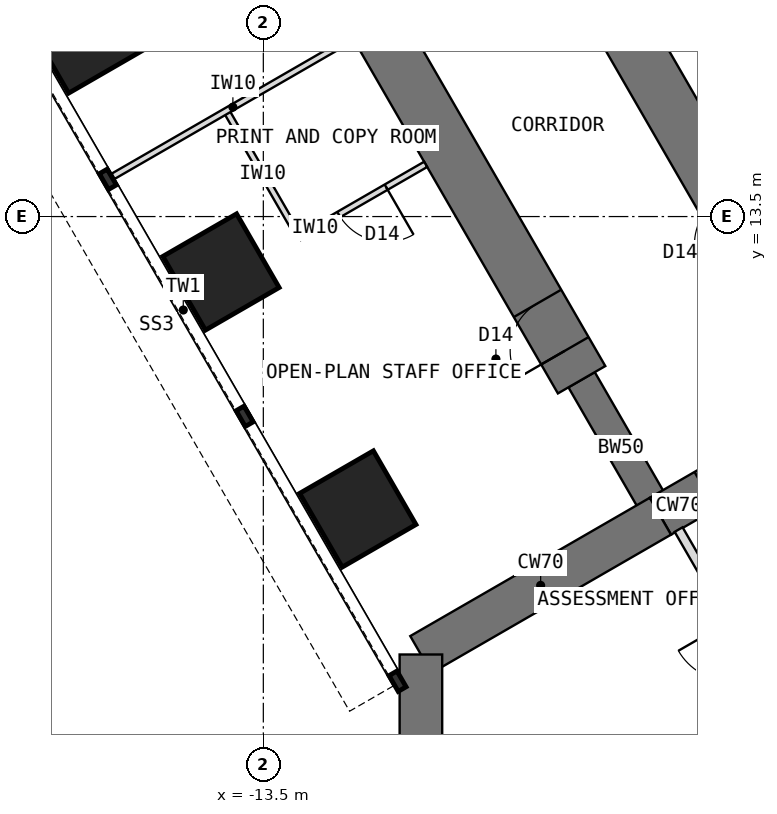
"""IFC4 building model, lengths in metres.
Left out: names, types, materials, properties, quantities, classifications, styles, units other than length and angle.
Written with IfcOpenShell. Run it as: python <this file> out.ifc"""

import sys

from ifc_helpers import new_model, si_unit, direction, frame, frame_2d, origin, origin_2d, place, context, subcontext, project, spatial, rectangle, extrude, element, fill, save


model = new_model("IFC4")
c1 = context("Model", 3, precision=1e-05, world=origin(), true_north=direction((0.0, 1.0)))
c2 = subcontext(c1, "Body", "Model", "MODEL_VIEW")
j1 = project(units=[si_unit("LENGTHUNIT", "METRE"), si_unit("PLANEANGLEUNIT", "RADIAN")], contexts=[c1])
p1 = place(None, origin())
s1 = spatial("IfcSite", under=j1, at=p1, CompositionType="ELEMENT")
p2 = place(p1, origin())
s2 = spatial("IfcBuilding", under=s1, at=p2, CompositionType="ELEMENT")
p3 = place(p2, frame((0.0, 0.0, 72.5)))
s3 = spatial("IfcBuildingStorey", under=s2, at=p3, CompositionType="ELEMENT", Elevation=72.5)
p4 = place(p3, frame((-3.939, 10.322, 0.0), z_axis=(0.0, 0.0, 1.0), x_axis=(-0.866019471182, -0.500010275428, 0.0)))
e1 = element("IfcWall", 1, at=p4, inside=s3, PredefinedType="SHEAR", context=c2, shape_type="SweptSolid", body=[
    extrude(rectangle(XDim=3.5, YDim=0.7, at=frame_2d((1.75, 0.0))), origin(), (0.0, 0.0, 1.0), 4.0),
])
p5 = place(p4, frame((0.85, 0.0, 0.0)))
e2 = element("IfcOpeningElement", 2, at=p5, cuts=e1, PredefinedType="OPENING", context=c2, shape_type="SweptSolid", body=[
    extrude(rectangle(XDim=1.8, YDim=2.1, at=frame_2d((0.9, 1.05))), frame((0.0, 0.36, 0.0), z_axis=(0.0, -1.0, 0.0), x_axis=(1.0, 0.0, 0.0)), (0.0, 0.0, 1.0), 0.72),
])
p6 = place(p3, frame((-6.97, 8.572, 0.0), z_axis=(0.0, 0.0, 1.0), x_axis=(-0.866034513004, -0.499984222037, 0.0)))
e3 = element("IfcWall", 3, at=p6, inside=s3, PredefinedType="SHEAR", context=c2, shape_type="SweptSolid", body=[
    extrude(rectangle(XDim=4.548, YDim=0.7, at=frame_2d((2.274, 0.0))), origin(), (0.0, 0.0, 1.0), 4.0),
])
p7 = place(p3, frame((-10.908, 6.298, 0.0), z_axis=(0.0, 0.0, 1.0), x_axis=(0.0, -1.0, 0.0)))
e4 = element("IfcWall", 4, at=p7, inside=s3, PredefinedType="SHEAR", context=c2, shape_type="SweptSolid", body=[
    extrude(rectangle(XDim=12.596, YDim=0.7, at=frame_2d((6.298, 0.0))), origin(), (0.0, 0.0, 1.0), 4.0),
])
p8 = place(p3, frame((-6.97, 8.572, 0.0), z_axis=(0.0, 0.0, 1.0), x_axis=(-0.499988811324, 0.866031863473, 0.0)))
e5 = element("IfcWall", 5, at=p8, inside=s3, PredefinedType="SHEAR", context=c2, shape_type="SweptSolid", body=[
    extrude(rectangle(XDim=2.592, YDim=0.5, at=frame_2d((1.296, 0.0))), origin(), (0.0, 0.0, 1.0), 4.0),
])
p9 = place(p3, frame((-8.266, 10.816, 0.0), z_axis=(0.0, 0.0, 1.0), x_axis=(-0.499996231654, 0.866027579429, 0.0)))
e6 = element("IfcWall", 6, at=p9, inside=s3, PredefinedType="SHEAR", context=c2, shape_type="SweptSolid", body=[
    extrude(rectangle(XDim=13.2, YDim=0.9, at=frame_2d((6.6, 0.0))), origin(), (0.0, 0.0, 1.0), 4.0),
])
p10 = place(p9, frame((0.55, 0.0, 0.0)))
e7 = element("IfcOpeningElement", 7, at=p10, cuts=e6, PredefinedType="OPENING", context=c2, shape_type="SweptSolid", body=[
    extrude(rectangle(XDim=0.9, YDim=2.1, at=frame_2d((0.45, 1.05))), frame((0.0, 0.46, 0.0), z_axis=(0.0, -1.0, 0.0), x_axis=(1.0, 0.0, 0.0)), (0.0, 0.0, 1.0), 0.92),
])
p11 = place(p9, frame((7.3, 0.0, 0.0)))
e8 = element("IfcOpeningElement", 8, at=p11, cuts=e6, PredefinedType="OPENING", context=c2, shape_type="SweptSolid", body=[
    extrude(rectangle(XDim=0.9, YDim=2.1, at=frame_2d((0.45, 1.05))), frame((0.0, 0.46, 0.0), z_axis=(0.0, -1.0, 0.0), x_axis=(1.0, 0.0, 0.0)), (0.0, 0.0, 1.0), 0.92),
])
p12 = place(p3, frame((-5.234, 12.566, 0.0), z_axis=(0.0, 0.0, 1.0), x_axis=(-0.500010103361, 0.866019570528, 0.0)))
e9 = element("IfcWall", 9, at=p12, inside=s3, PredefinedType="SHEAR", context=c2, shape_type="SweptSolid", body=[
    extrude(rectangle(XDim=13.2, YDim=0.9, at=frame_2d((6.6, 0.0))), origin(), (0.0, 0.0, 1.0), 4.0),
])
p13 = place(p12, frame((0.55, 0.0, 0.0)))
e10 = element("IfcOpeningElement", 10, at=p13, cuts=e9, PredefinedType="OPENING", context=c2, shape_type="SweptSolid", body=[
    extrude(rectangle(XDim=0.9, YDim=2.1, at=frame_2d((0.45, 1.05))), frame((0.0, 0.46, 0.0), z_axis=(0.0, -1.0, 0.0), x_axis=(1.0, 0.0, 0.0)), (0.0, 0.0, 1.0), 0.92),
])
p14 = place(p12, frame((7.3, 0.0, 0.0)))
e11 = element("IfcOpeningElement", 11, at=p14, cuts=e9, PredefinedType="OPENING", context=c2, shape_type="SweptSolid", body=[
    extrude(rectangle(XDim=0.9, YDim=2.1, at=frame_2d((0.45, 1.05))), frame((0.0, 0.46, 0.0), z_axis=(0.0, -1.0, 0.0), x_axis=(1.0, 0.0, 0.0)), (0.0, 0.0, 1.0), 0.92),
])
for number, where, z_axis, x_axis in (
    (12, (-11.946, 8.691, 0.0), (0.0, 0.0, 1.0), (0.866, 0.5, 0.0)),
    (13, (-14.196, 12.588, 0.0), (0.0, 0.0, 1.0), (0.866, 0.5, 0.0)),
    (14, (-16.446, 16.486, 0.0), (0.0, 0.0, 1.0), (0.866, 0.5, 0.0)),
):
    element("IfcColumn", number, at=place(p3, frame(where, z_axis=z_axis, x_axis=x_axis)), inside=s3, PredefinedType="COLUMN", context=c2, shape_type="SweptSolid", body=[
        extrude(rectangle(XDim=1.4, YDim=1.4, at=origin_2d()), origin(), (0.0, 0.0, 1.0), 4.0),
    ])
p15 = place(p3, frame((-12.03, 16.437, 0.0), z_axis=(0.0, 0.0, 1.0), x_axis=(-0.866035472144, -0.499982560684, 0.0)))
e15 = element("IfcWall", 15, at=p15, inside=s3, PredefinedType="PARTITIONING", context=c2, shape_type="SweptSolid", body=[
    extrude(rectangle(XDim=4.55, YDim=0.1, at=frame_2d((2.275, 0.0))), origin(), (0.0, 0.0, 1.0), 3.8),
])
p16 = place(p3, frame((-12.909, 13.158, 0.0), z_axis=(0.0, 0.0, 1.0), x_axis=(-0.499957262057, 0.866050077142, 0.0)))
e16 = element("IfcWall", 16, at=p16, inside=s3, PredefinedType="PARTITIONING", context=c2, shape_type="SweptSolid", body=[
    extrude(rectangle(XDim=2.4, YDim=0.1, at=frame_2d((1.2, 0.0))), origin(), (0.0, 0.0, 1.0), 3.8),
])
p17 = place(p3, frame((-10.83, 14.359, 0.0), z_axis=(0.0, 0.0, 1.0), x_axis=(-0.865980596518, -0.500077600433, 0.0)))
e17 = element("IfcWall", 17, at=p17, inside=s3, PredefinedType="PARTITIONING", context=c2, shape_type="SweptSolid", body=[
    extrude(rectangle(XDim=2.4, YDim=0.1, at=frame_2d((1.2, 0.0))), origin(), (0.0, 0.0, 1.0), 3.8),
])
p18 = place(p17, frame((0.75, 0.0, 0.0)))
e18 = element("IfcOpeningElement", 18, at=p18, cuts=e17, PredefinedType="OPENING", context=c2, shape_type="SweptSolid", body=[
    extrude(rectangle(XDim=0.9, YDim=2.1, at=frame_2d((0.45, 1.05))), frame((0.0, 0.06, 0.0), z_axis=(0.0, -1.0, 0.0), x_axis=(1.0, 0.0, 0.0)), (0.0, 0.0, 1.0), 0.12),
])
p19 = place(p3, frame((-4.436, 4.483, 0.0), z_axis=(0.0, 0.0, 1.0), x_axis=(-0.500017246033, 0.866015446554, 0.0)))
e19 = element("IfcWall", 19, at=p19, inside=s3, PredefinedType="PARTITIONING", context=c2, shape_type="SweptSolid", body=[
    extrude(rectangle(XDim=4.469, YDim=0.15, at=frame_2d((2.234, 0.0))), origin(), (0.0, 0.0, 1.0), 3.8),
])
p20 = place(p19, frame((1.744, 0.0, 0.0)))
e20 = element("IfcOpeningElement", 20, at=p20, cuts=e19, PredefinedType="OPENING", context=c2, shape_type="SweptSolid", body=[
    extrude(rectangle(XDim=1.0, YDim=2.1, at=frame_2d((0.5, 1.05))), frame((0.0, 0.085, 0.0), z_axis=(0.0, -1.0, 0.0), x_axis=(1.0, 0.0, 0.0)), (0.0, 0.0, 1.0), 0.17),
])
p21 = place(p5, origin())
e21 = element("IfcDoor", 21, at=p21, inside=s3, OperationType="DOUBLE_DOOR_DOUBLE_SWING", PredefinedType="DOOR", context=c2, shape_type="SweptSolid", body=[
    extrude(rectangle(XDim=1.72, YDim=2.06, at=frame_2d((0.9, 1.03))), frame((0.0, 0.025, 0.0), z_axis=(0.0, -1.0, 0.0), x_axis=(1.0, 0.0, 0.0)), (0.0, 0.0, 1.0), 0.05),
    extrude(rectangle(XDim=0.04, YDim=2.1, at=frame_2d((0.02, 1.05))), frame((0.0, 0.35, 0.0), z_axis=(0.0, -1.0, 0.0), x_axis=(1.0, 0.0, 0.0)), (0.0, 0.0, 1.0), 0.699),
    extrude(rectangle(XDim=0.04, YDim=2.1, at=frame_2d((1.78, 1.05))), frame((0.0, 0.35, 0.0), z_axis=(0.0, -1.0, 0.0), x_axis=(1.0, 0.0, 0.0)), (0.0, 0.0, 1.0), 0.699),
    extrude(rectangle(XDim=1.72, YDim=0.04, at=frame_2d((0.9, 2.08))), frame((0.0, 0.35, 0.0), z_axis=(0.0, -1.0, 0.0), x_axis=(1.0, 0.0, 0.0)), (0.0, 0.0, 1.0), 0.699),
])
fill(e2, e21)
p22 = place(p18, origin())
e22 = element("IfcDoor", 22, at=p22, inside=s3, OperationType="SINGLE_SWING_LEFT", PredefinedType="DOOR", context=c2, shape_type="SweptSolid", body=[
    extrude(rectangle(XDim=0.9, YDim=2.1, at=frame_2d((0.45, 1.05))), frame((0.0, 0.025, 0.0), z_axis=(0.0, -1.0, 0.0), x_axis=(1.0, 0.0, 0.0)), (0.0, 0.0, 1.0), 0.05),
])
fill(e18, e22)
p23 = place(p10, origin())
e23 = element("IfcDoor", 23, at=p23, inside=s3, OperationType="SINGLE_SWING_LEFT", PredefinedType="DOOR", context=c2, shape_type="SweptSolid", body=[
    extrude(rectangle(XDim=0.82, YDim=2.06, at=frame_2d((0.45, 1.03))), frame((0.0, 0.025, 0.0), z_axis=(0.0, -1.0, 0.0), x_axis=(1.0, 0.0, 0.0)), (0.0, 0.0, 1.0), 0.05),
    extrude(rectangle(XDim=0.04, YDim=2.1, at=frame_2d((0.02, 1.05))), frame((0.0, 0.45, 0.0), z_axis=(0.0, -1.0, 0.0), x_axis=(1.0, 0.0, 0.0)), (0.0, 0.0, 1.0), 0.899),
    extrude(rectangle(XDim=0.04, YDim=2.1, at=frame_2d((0.88, 1.05))), frame((0.0, 0.45, 0.0), z_axis=(0.0, -1.0, 0.0), x_axis=(1.0, 0.0, 0.0)), (0.0, 0.0, 1.0), 0.899),
    extrude(rectangle(XDim=0.82, YDim=0.04, at=frame_2d((0.45, 2.08))), frame((0.0, 0.45, 0.0), z_axis=(0.0, -1.0, 0.0), x_axis=(1.0, 0.0, 0.0)), (0.0, 0.0, 1.0), 0.899),
])
fill(e7, e23)
save(model, sys.argv[1])
